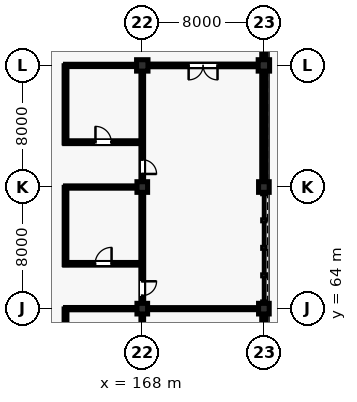
"""IFC4 building model, lengths in metres.
Left out: names, types, materials, properties, quantities, classifications, styles, units other than length and angle.
Written with IfcOpenShell. Run it as: python <this file> out.ifc"""

import sys

from ifc_helpers import new_model, si_unit, direction, frame, frame_2d, origin, origin_2d, place, context, subcontext, project, spatial, rectangle, extrude, element, fill, save


model = new_model("IFC4")
c1 = context("Model", 3, precision=1e-05, world=origin(), true_north=direction((0.0, 1.0)))
c2 = subcontext(c1, "Body", "Model", "MODEL_VIEW")
j1 = project(units=[si_unit("LENGTHUNIT", "METRE"), si_unit("PLANEANGLEUNIT", "RADIAN")], contexts=[c1])
p1 = place(None, origin())
s1 = spatial("IfcSite", under=j1, at=p1, CompositionType="ELEMENT")
p2 = place(p1, origin())
s2 = spatial("IfcBuilding", under=s1, at=p2, CompositionType="ELEMENT")
p3 = place(p2, origin())
s3 = spatial("IfcBuildingStorey", under=s2, at=p3, CompositionType="ELEMENT", Elevation=0.0)
for number, where, z_axis, x_axis in (
    (1, (168.0, 64.0, 0.0), (0.0, 0.0, 1.0), (1.0, 0.0, 0.0)),
    (2, (168.0, 72.0, 0.0), (0.0, 0.0, 1.0), (1.0, 0.0, 0.0)),
):
    element("IfcColumn", number, at=place(p3, frame(where, z_axis=z_axis, x_axis=x_axis)), inside=s3, PredefinedType="COLUMN", context=c2, shape_type="SweptSolid", body=[
        extrude(rectangle(XDim=0.7, YDim=0.7, at=origin_2d()), origin(), (0.0, 0.0, 1.0), 5.28),
    ])
p4 = place(p3, frame((168.0, 80.0, 0.0), z_axis=(0.0, 0.0, 1.0), x_axis=(1.0, 0.0, 0.0)))
e3 = element("IfcColumn", 3, at=p4, inside=s3, PredefinedType="COLUMN", context=c2, shape_type="SweptSolid", body=[
    extrude(rectangle(XDim=0.75, YDim=0.75, at=origin_2d()), origin(), (0.0, 0.0, 1.0), 5.28),
])
for number, where, z_axis, x_axis in (
    (4, (176.0, 64.0, 0.0), (0.0, 0.0, 1.0), (1.0, 0.0, 0.0)),
    (5, (176.0, 72.0, 0.0), (0.0, 0.0, 1.0), (1.0, 0.0, 0.0)),
):
    element("IfcColumn", number, at=place(p3, frame(where, z_axis=z_axis, x_axis=x_axis)), inside=s3, PredefinedType="COLUMN", context=c2, shape_type="SweptSolid", body=[
        extrude(rectangle(XDim=0.7, YDim=0.7, at=origin_2d()), origin(), (0.0, 0.0, 1.0), 5.28),
    ])
p5 = place(p3, frame((176.0, 80.0, 0.0), z_axis=(0.0, 0.0, 1.0), x_axis=(1.0, 0.0, 0.0)))
e6 = element("IfcColumn", 6, at=p5, inside=s3, PredefinedType="COLUMN", context=c2, shape_type="SweptSolid", body=[
    extrude(rectangle(XDim=0.75, YDim=0.75, at=origin_2d()), origin(), (0.0, 0.0, 1.0), 5.28),
])
p6 = place(p3, frame((176.0, 56.335, 0.0), z_axis=(0.0, 0.0, 1.0), x_axis=(0.0, 1.0, 0.0)))
e7 = element("IfcWall", 7, at=p6, inside=s3, PredefinedType="SOLIDWALL", context=c2, shape_type="SweptSolid", body=[
    extrude(rectangle(XDim=7.33, YDim=0.28, at=frame_2d((3.665, 0.0))), origin(), (0.0, 0.0, 1.0), 4.674),
])
p7 = place(p6, frame((2.465, 0.0, 0.9)))
e8 = element("IfcOpeningElement", 8, at=p7, cuts=e7, PredefinedType="OPENING", context=c2, shape_type="SweptSolid", body=[
    extrude(rectangle(XDim=2.4, YDim=2.8, at=frame_2d((1.2, 1.4))), frame((0.0, 0.15, 0.0), z_axis=(0.0, -1.0, 0.0), x_axis=(1.0, 0.0, 0.0)), (0.0, 0.0, 1.0), 0.3),
])
p8 = place(p3, frame((176.0, 72.335, 0.0), z_axis=(0.0, 0.0, 1.0), x_axis=(0.0, 1.0, 0.0)))
e9 = element("IfcWall", 9, at=p8, inside=s3, PredefinedType="SOLIDWALL", context=c2, shape_type="SweptSolid", body=[
    extrude(rectangle(XDim=7.305, YDim=0.28, at=frame_2d((3.652, 0.0))), origin(), (0.0, 0.0, 1.0), 4.677),
])
p9 = place(p8, frame((2.728, 0.0, 0.9)))
e10 = element("IfcOpeningElement", 10, at=p9, cuts=e9, PredefinedType="OPENING", context=c2, shape_type="SweptSolid", body=[
    extrude(rectangle(XDim=1.85, YDim=2.65, at=frame_2d((0.925, 1.325))), frame((0.0, 0.15, 0.0), z_axis=(0.0, -1.0, 0.0), x_axis=(1.0, 0.0, 0.0)), (0.0, 0.0, 1.0), 0.3),
])
p10 = place(p3, frame((176.0, 80.36, 0.0), z_axis=(0.0, 0.0, 1.0), x_axis=(0.0, 1.0, 0.0)))
e11 = element("IfcWall", 11, at=p10, inside=s3, PredefinedType="SOLIDWALL", context=c2, shape_type="SweptSolid", body=[
    extrude(rectangle(XDim=7.28, YDim=0.28, at=frame_2d((3.64, 0.0))), origin(), (0.0, 0.0, 1.0), 4.61),
])
p11 = place(p10, frame((0.635, 0.0, 0.95)))
e12 = element("IfcOpeningElement", 12, at=p11, cuts=e11, PredefinedType="OPENING", context=c2, shape_type="SweptSolid", body=[
    extrude(rectangle(XDim=1.35, YDim=1.9, at=frame_2d((0.675, 0.95))), frame((0.0, 0.15, 0.0), z_axis=(0.0, -1.0, 0.0), x_axis=(1.0, 0.0, 0.0)), (0.0, 0.0, 1.0), 0.3),
])
p12 = place(p10, frame((5.295, 0.0, 0.95)))
e13 = element("IfcOpeningElement", 13, at=p12, cuts=e11, PredefinedType="OPENING", context=c2, shape_type="SweptSolid", body=[
    extrude(rectangle(XDim=1.35, YDim=1.9, at=frame_2d((0.675, 0.95))), frame((0.0, 0.15, 0.0), z_axis=(0.0, -1.0, 0.0), x_axis=(1.0, 0.0, 0.0)), (0.0, 0.0, 1.0), 0.3),
])
p13 = place(p3, frame((162.95, 58.9, 0.0), z_axis=(0.0, 0.0, 1.0), x_axis=(0.0, 1.0, 0.0)))
e14 = element("IfcWall", 14, at=p13, inside=s3, PredefinedType="PARTITIONING", context=c2, shape_type="SweptSolid", body=[
    extrude(rectangle(XDim=5.08, YDim=0.185, at=frame_2d((2.54, 0.0))), origin(), (0.0, 0.0, 1.0), 4.332),
])
p14 = place(p3, frame((162.95, 64.0, 0.0), z_axis=(0.0, 0.0, 1.0), x_axis=(1.0, 0.0, 0.0)))
e15 = element("IfcWall", 15, at=p14, inside=s3, PredefinedType="PARTITIONING", context=c2, shape_type="SweptSolid", body=[
    extrude(rectangle(XDim=4.69, YDim=0.15, at=frame_2d((2.345, 0.0))), origin(), (0.0, 0.0, 1.0), 4.332),
])
p15 = place(p3, frame((162.9, 66.95, 0.0), z_axis=(0.0, 0.0, 1.0), x_axis=(1.0, 0.0, 0.0)))
e16 = element("IfcWall", 16, at=p15, inside=s3, PredefinedType="PARTITIONING", context=c2, shape_type="SweptSolid", body=[
    extrude(rectangle(XDim=5.08, YDim=0.175, at=frame_2d((2.54, 0.0))), origin(), (0.0, 0.0, 1.0), 4.412),
])
p16 = place(p15, frame((2.0, 0.0, 0.0)))
e17 = element("IfcOpeningElement", 17, at=p16, cuts=e16, PredefinedType="OPENING", context=c2, shape_type="SweptSolid", body=[
    extrude(rectangle(XDim=1.08, YDim=2.2, at=frame_2d((0.54, 1.1))), frame((0.0, 0.097, 0.0), z_axis=(0.0, -1.0, 0.0), x_axis=(1.0, 0.0, 0.0)), (0.0, 0.0, 1.0), 0.195),
])
p17 = place(p3, frame((162.95, 66.9, 0.0), z_axis=(0.0, 0.0, 1.0), x_axis=(0.0, 1.0, 0.0)))
e18 = element("IfcWall", 18, at=p17, inside=s3, PredefinedType="PARTITIONING", context=c2, shape_type="SweptSolid", body=[
    extrude(rectangle(XDim=5.08, YDim=0.175, at=frame_2d((2.54, 0.0))), origin(), (0.0, 0.0, 1.0), 4.408),
])
p18 = place(p3, frame((162.95, 72.0, 0.0), z_axis=(0.0, 0.0, 1.0), x_axis=(1.0, 0.0, 0.0)))
e19 = element("IfcWall", 19, at=p18, inside=s3, PredefinedType="PARTITIONING", context=c2, shape_type="SweptSolid", body=[
    extrude(rectangle(XDim=4.69, YDim=0.15, at=frame_2d((2.345, 0.0))), origin(), (0.0, 0.0, 1.0), 4.408),
])
p19 = place(p3, frame((162.9, 74.95, 0.0), z_axis=(0.0, 0.0, 1.0), x_axis=(1.0, 0.0, 0.0)))
e20 = element("IfcWall", 20, at=p19, inside=s3, PredefinedType="PARTITIONING", context=c2, shape_type="SweptSolid", body=[
    extrude(rectangle(XDim=5.08, YDim=0.185, at=frame_2d((2.54, 0.0))), origin(), (0.0, 0.0, 1.0), 4.404),
])
p20 = place(p19, frame((2.02, 0.0, 0.0)))
e21 = element("IfcOpeningElement", 21, at=p20, cuts=e20, PredefinedType="OPENING", context=c2, shape_type="SweptSolid", body=[
    extrude(rectangle(XDim=1.04, YDim=2.18, at=frame_2d((0.52, 1.09))), frame((0.0, 0.103, 0.0), z_axis=(0.0, -1.0, 0.0), x_axis=(1.0, 0.0, 0.0)), (0.0, 0.0, 1.0), 0.205),
])
p21 = place(p3, frame((162.95, 74.9, 0.0), z_axis=(0.0, 0.0, 1.0), x_axis=(0.0, 1.0, 0.0)))
e22 = element("IfcWall", 22, at=p21, inside=s3, PredefinedType="PARTITIONING", context=c2, shape_type="SweptSolid", body=[
    extrude(rectangle(XDim=5.08, YDim=0.185, at=frame_2d((2.54, 0.0))), origin(), (0.0, 0.0, 1.0), 4.341),
])
p22 = place(p3, frame((162.95, 80.0, 0.0), z_axis=(0.0, 0.0, 1.0), x_axis=(1.0, 0.0, 0.0)))
e23 = element("IfcWall", 23, at=p22, inside=s3, PredefinedType="PARTITIONING", context=c2, shape_type="SweptSolid", body=[
    extrude(rectangle(XDim=4.665, YDim=0.15, at=frame_2d((2.333, 0.0))), origin(), (0.0, 0.0, 1.0), 4.341),
])
p23 = place(p3, frame((168.0, 56.34, 0.0), z_axis=(0.0, 0.0, 1.0), x_axis=(0.0, 1.0, 0.0)))
e24 = element("IfcWall", 24, at=p23, inside=s3, PredefinedType="PARTITIONING", context=c2, shape_type="SweptSolid", body=[
    extrude(rectangle(XDim=7.32, YDim=0.175, at=frame_2d((3.66, 0.0))), origin(), (0.0, 0.0, 1.0), 4.403),
])
p24 = place(p23, frame((0.52, 0.0, 0.0)))
e25 = element("IfcOpeningElement", 25, at=p24, cuts=e24, PredefinedType="OPENING", context=c2, shape_type="SweptSolid", body=[
    extrude(rectangle(XDim=0.94, YDim=2.12, at=frame_2d((0.47, 1.06))), frame((0.0, 0.097, 0.0), z_axis=(0.0, -1.0, 0.0), x_axis=(1.0, 0.0, 0.0)), (0.0, 0.0, 1.0), 0.195),
])
p25 = place(p3, frame((168.0, 64.34, 0.0), z_axis=(0.0, 0.0, 1.0), x_axis=(0.0, 1.0, 0.0)))
e26 = element("IfcWall", 26, at=p25, inside=s3, PredefinedType="PARTITIONING", context=c2, shape_type="SweptSolid", body=[
    extrude(rectangle(XDim=7.32, YDim=0.185, at=frame_2d((3.66, 0.0))), origin(), (0.0, 0.0, 1.0), 4.412),
])
p26 = place(p25, frame((0.52, 0.0, 0.0)))
e27 = element("IfcOpeningElement", 27, at=p26, cuts=e26, PredefinedType="OPENING", context=c2, shape_type="SweptSolid", body=[
    extrude(rectangle(XDim=0.94, YDim=2.12, at=frame_2d((0.47, 1.06))), frame((0.0, 0.103, 0.0), z_axis=(0.0, -1.0, 0.0), x_axis=(1.0, 0.0, 0.0)), (0.0, 0.0, 1.0), 0.205),
])
p27 = place(p3, frame((168.0, 72.34, 0.0), z_axis=(0.0, 0.0, 1.0), x_axis=(0.0, 1.0, 0.0)))
e28 = element("IfcWall", 28, at=p27, inside=s3, PredefinedType="PARTITIONING", context=c2, shape_type="SweptSolid", body=[
    extrude(rectangle(XDim=7.295, YDim=0.175, at=frame_2d((3.647, 0.0))), origin(), (0.0, 0.0, 1.0), 4.404),
])
p28 = place(p27, frame((0.52, 0.0, 0.0)))
e29 = element("IfcOpeningElement", 29, at=p28, cuts=e28, PredefinedType="OPENING", context=c2, shape_type="SweptSolid", body=[
    extrude(rectangle(XDim=0.94, YDim=2.12, at=frame_2d((0.47, 1.06))), frame((0.0, 0.097, 0.0), z_axis=(0.0, -1.0, 0.0), x_axis=(1.0, 0.0, 0.0)), (0.0, 0.0, 1.0), 0.195),
])
p29 = place(p3, frame((168.34, 64.0, 0.0), z_axis=(0.0, 0.0, 1.0), x_axis=(1.0, 0.0, 0.0)))
e30 = element("IfcWall", 30, at=p29, inside=s3, PredefinedType="PARTITIONING", context=c2, shape_type="SweptSolid", body=[
    extrude(rectangle(XDim=7.32, YDim=0.135, at=frame_2d((3.66, 0.0))), origin(), (0.0, 0.0, 1.0), 4.403),
])
p30 = place(p3, frame((168.365, 80.0, 0.0), z_axis=(0.0, 0.0, 1.0), x_axis=(1.0, 0.0, 0.0)))
e31 = element("IfcWall", 31, at=p30, inside=s3, PredefinedType="PARTITIONING", context=c2, shape_type="SweptSolid", body=[
    extrude(rectangle(XDim=7.27, YDim=0.175, at=frame_2d((3.635, 0.0))), origin(), (0.0, 0.0, 1.0), 4.404),
])
p31 = place(p30, frame((2.685, 0.0, 0.0)))
e32 = element("IfcOpeningElement", 32, at=p31, cuts=e31, PredefinedType="OPENING", context=c2, shape_type="SweptSolid", body=[
    extrude(rectangle(XDim=1.9, YDim=2.38, at=frame_2d((0.95, 1.19))), frame((0.0, 0.097, 0.0), z_axis=(0.0, -1.0, 0.0), x_axis=(1.0, 0.0, 0.0)), (0.0, 0.0, 1.0), 0.195),
])
p32 = place(p9, origin())
e33 = element("IfcWindow", 33, at=p32, inside=s3, PartitioningType="SINGLE_PANEL", PredefinedType="WINDOW", context=c2, shape_type="SweptSolid", body=[
    extrude(rectangle(XDim=1.85, YDim=2.65, at=frame_2d((0.925, 1.325))), frame((0.0, 0.03, 0.0), z_axis=(0.0, -1.0, 0.0), x_axis=(1.0, 0.0, 0.0)), (0.0, 0.0, 1.0), 0.06),
])
fill(e10, e33)
p33 = place(p16, origin())
e34 = element("IfcDoor", 34, at=p33, inside=s3, OperationType="SINGLE_SWING_RIGHT", PredefinedType="DOOR", context=c2, shape_type="SweptSolid", body=[
    extrude(rectangle(XDim=1.08, YDim=2.2, at=frame_2d((0.54, 1.1))), frame((0.0, 0.025, 0.0), z_axis=(0.0, -1.0, 0.0), x_axis=(1.0, 0.0, 0.0)), (0.0, 0.0, 1.0), 0.05),
])
fill(e17, e34)
p34 = place(p20, origin())
e35 = element("IfcDoor", 35, at=p34, inside=s3, OperationType="SINGLE_SWING_LEFT", PredefinedType="DOOR", context=c2, shape_type="SweptSolid", body=[
    extrude(rectangle(XDim=1.04, YDim=2.18, at=frame_2d((0.52, 1.09))), frame((0.0, 0.025, 0.0), z_axis=(0.0, -1.0, 0.0), x_axis=(1.0, 0.0, 0.0)), (0.0, 0.0, 1.0), 0.05),
])
fill(e21, e35)
p35 = place(p26, frame((0.94, 0.0, 0.0), z_axis=(0.0, 0.0, 1.0), x_axis=(-1.0, 0.0, 0.0)))
e36 = element("IfcDoor", 36, at=p35, inside=s3, OperationType="SINGLE_SWING_RIGHT", PredefinedType="DOOR", context=c2, shape_type="SweptSolid", body=[
    extrude(rectangle(XDim=0.94, YDim=2.12, at=frame_2d((0.47, 1.06))), frame((0.0, 0.025, 0.0), z_axis=(0.0, -1.0, 0.0), x_axis=(1.0, 0.0, 0.0)), (0.0, 0.0, 1.0), 0.05),
])
fill(e27, e36)
p36 = place(p28, frame((0.94, 0.0, 0.0), z_axis=(0.0, 0.0, 1.0), x_axis=(-1.0, 0.0, 0.0)))
e37 = element("IfcDoor", 37, at=p36, inside=s3, OperationType="SINGLE_SWING_LEFT", PredefinedType="DOOR", context=c2, shape_type="SweptSolid", body=[
    extrude(rectangle(XDim=0.94, YDim=2.12, at=frame_2d((0.47, 1.06))), frame((0.0, 0.025, 0.0), z_axis=(0.0, -1.0, 0.0), x_axis=(1.0, 0.0, 0.0)), (0.0, 0.0, 1.0), 0.05),
])
fill(e29, e37)
p37 = place(p31, frame((1.9, 0.0, 0.0), z_axis=(0.0, 0.0, 1.0), x_axis=(-1.0, 0.0, 0.0)))
e38 = element("IfcDoor", 38, at=p37, inside=s3, OperationType="DOUBLE_DOOR_SINGLE_SWING", PredefinedType="DOOR", context=c2, shape_type="SweptSolid", body=[
    extrude(rectangle(XDim=1.9, YDim=2.38, at=frame_2d((0.95, 1.19))), frame((0.0, 0.025, 0.0), z_axis=(0.0, -1.0, 0.0), x_axis=(1.0, 0.0, 0.0)), (0.0, 0.0, 1.0), 0.05),
])
fill(e32, e38)
save(model, sys.argv[1])
